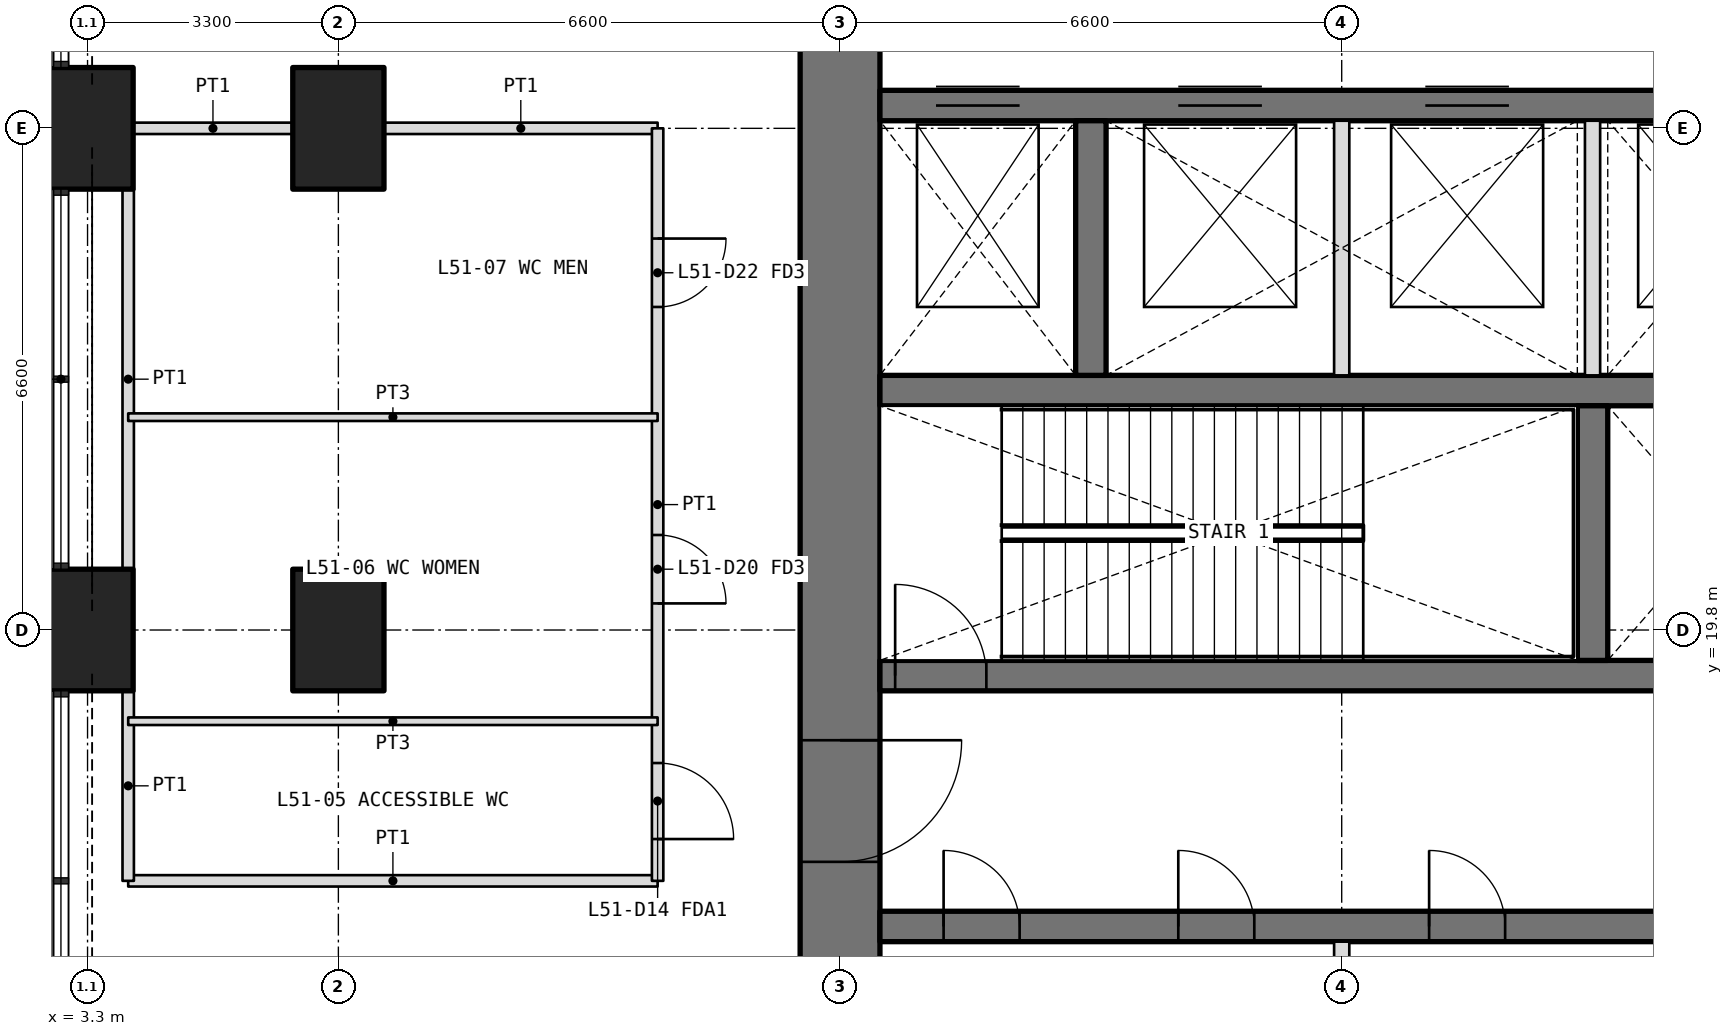
"""IFC4 building model, lengths in metres.
Left out: names, types, materials, properties, quantities, classifications, styles, units other than length and angle.
Written with IfcOpenShell. Run it as: python <this file> out.ifc"""

import sys

from ifc_helpers import new_model, si_unit, direction, frame, frame_2d, origin, origin_2d, place, context, subcontext, project, spatial, rectangle, extrude, element, fill, save


model = new_model("IFC4")
c1 = context("Model", 3, precision=1e-05, world=origin(), true_north=direction((0.0, 1.0)))
c2 = subcontext(c1, "Body", "Model", "MODEL_VIEW")
j1 = project(units=[si_unit("LENGTHUNIT", "METRE"), si_unit("PLANEANGLEUNIT", "RADIAN")], contexts=[c1])
p1 = place(None, origin())
s1 = spatial("IfcSite", under=j1, at=p1, CompositionType="ELEMENT")
p2 = place(p1, origin())
s2 = spatial("IfcBuilding", under=s1, at=p2, CompositionType="ELEMENT")
p3 = place(p2, frame((0.0, 0.0, 222.9)))
s3 = spatial("IfcBuildingStorey", under=s2, at=p3, CompositionType="ELEMENT", Elevation=222.9)
for number, where, z_axis, x_axis in (
    (1, (3.3, 19.8, 0.0), (0.0, 0.0, 1.0), (0.0, 1.0, 0.0)),
    (2, (3.3, 26.4, 0.0), (0.0, 0.0, 1.0), (0.0, 1.0, 0.0)),
    (3, (6.6, 19.8, 0.0), (0.0, 0.0, 1.0), (0.0, 1.0, 0.0)),
    (4, (6.6, 26.4, 0.0), (0.0, 0.0, 1.0), (0.0, 1.0, 0.0)),
):
    element("IfcColumn", number, at=place(p3, frame(where, z_axis=z_axis, x_axis=x_axis)), inside=s3, PredefinedType="COLUMN", context=c2, shape_type="SweptSolid", body=[
        extrude(rectangle(XDim=1.6, YDim=1.2, at=origin_2d()), origin(), (0.0, 0.0, 1.0), 6.3),
    ])
p4 = place(p3, frame((13.2, 32.475, 0.0), z_axis=(0.0, 0.0, 1.0), x_axis=(0.0, -1.0, 0.0)))
e5 = element("IfcWall", 5, at=p4, inside=s3, PredefinedType="SHEAR", context=c2, shape_type="SweptSolid", body=[
    extrude(rectangle(XDim=18.75, YDim=1.05, at=frame_2d((9.375, 0.0))), origin(), (0.0, 0.0, 1.0), 6.3),
])
p5 = place(p4, frame((14.125, 0.0, 0.0)))
e6 = element("IfcOpeningElement", 6, at=p5, cuts=e5, PredefinedType="OPENING", context=c2, shape_type="SweptSolid", body=[
    extrude(rectangle(XDim=1.6, YDim=2.1, at=frame_2d((0.8, 1.05))), frame((0.0, 0.535, 0.0), z_axis=(0.0, -1.0, 0.0), x_axis=(1.0, 0.0, 0.0)), (0.0, 0.0, 1.0), 1.07),
])
p6 = place(p4, frame((3.325, 0.0, 0.0)))
e7 = element("IfcOpeningElement", 7, at=p6, cuts=e5, PredefinedType="OPENING", context=c2, shape_type="SweptSolid", body=[
    extrude(rectangle(XDim=1.6, YDim=2.1, at=frame_2d((0.8, 1.05))), frame((0.0, 0.535, 0.0), z_axis=(0.0, -1.0, 0.0), x_axis=(1.0, 0.0, 0.0)), (0.0, 0.0, 1.0), 1.07),
])
p7 = place(p3, frame((13.725, 15.9, 0.0), z_axis=(0.0, 0.0, 1.0), x_axis=(1.0, 0.0, 0.0)))
e8 = element("IfcWall", 8, at=p7, inside=s3, PredefinedType="SHEAR", context=c2, shape_type="SweptSolid", body=[
    extrude(rectangle(XDim=25.35, YDim=0.4, at=frame_2d((12.675, 0.0))), origin(), (0.0, 0.0, 1.0), 6.3),
])
p8 = place(p7, frame((0.837, 0.0, 0.0)))
e9 = element("IfcOpeningElement", 9, at=p8, cuts=e8, PredefinedType="OPENING", context=c2, shape_type="SweptSolid", body=[
    extrude(rectangle(XDim=1.0, YDim=2.1, at=frame_2d((0.5, 1.05))), frame((0.0, 0.21, 0.0), z_axis=(0.0, -1.0, 0.0), x_axis=(1.0, 0.0, 0.0)), (0.0, 0.0, 1.0), 0.42),
])
p9 = place(p7, frame((3.925, 0.0, 0.0)))
e10 = element("IfcOpeningElement", 10, at=p9, cuts=e8, PredefinedType="OPENING", context=c2, shape_type="SweptSolid", body=[
    extrude(rectangle(XDim=1.0, YDim=2.1, at=frame_2d((0.5, 1.05))), frame((0.0, 0.21, 0.0), z_axis=(0.0, -1.0, 0.0), x_axis=(1.0, 0.0, 0.0)), (0.0, 0.0, 1.0), 0.42),
])
p10 = place(p7, frame((7.225, 0.0, 0.0)))
e11 = element("IfcOpeningElement", 11, at=p10, cuts=e8, PredefinedType="OPENING", context=c2, shape_type="SweptSolid", body=[
    extrude(rectangle(XDim=1.0, YDim=2.1, at=frame_2d((0.5, 1.05))), frame((0.0, 0.21, 0.0), z_axis=(0.0, -1.0, 0.0), x_axis=(1.0, 0.0, 0.0)), (0.0, 0.0, 1.0), 0.42),
])
p11 = place(p7, frame((10.525, 0.0, 0.0)))
e12 = element("IfcOpeningElement", 12, at=p11, cuts=e8, PredefinedType="OPENING", context=c2, shape_type="SweptSolid", body=[
    extrude(rectangle(XDim=1.0, YDim=2.1, at=frame_2d((0.5, 1.05))), frame((0.0, 0.21, 0.0), z_axis=(0.0, -1.0, 0.0), x_axis=(1.0, 0.0, 0.0)), (0.0, 0.0, 1.0), 0.42),
])
p12 = place(p7, frame((13.825, 0.0, 0.0)))
e13 = element("IfcOpeningElement", 13, at=p12, cuts=e8, PredefinedType="OPENING", context=c2, shape_type="SweptSolid", body=[
    extrude(rectangle(XDim=1.0, YDim=2.1, at=frame_2d((0.5, 1.05))), frame((0.0, 0.21, 0.0), z_axis=(0.0, -1.0, 0.0), x_axis=(1.0, 0.0, 0.0)), (0.0, 0.0, 1.0), 0.42),
])
p13 = place(p7, frame((17.125, 0.0, 0.0)))
e14 = element("IfcOpeningElement", 14, at=p13, cuts=e8, PredefinedType="OPENING", context=c2, shape_type="SweptSolid", body=[
    extrude(rectangle(XDim=1.0, YDim=2.1, at=frame_2d((0.5, 1.05))), frame((0.0, 0.21, 0.0), z_axis=(0.0, -1.0, 0.0), x_axis=(1.0, 0.0, 0.0)), (0.0, 0.0, 1.0), 0.42),
])
p14 = place(p7, frame((20.425, 0.0, 0.0)))
e15 = element("IfcOpeningElement", 15, at=p14, cuts=e8, PredefinedType="OPENING", context=c2, shape_type="SweptSolid", body=[
    extrude(rectangle(XDim=1.0, YDim=2.1, at=frame_2d((0.5, 1.05))), frame((0.0, 0.21, 0.0), z_axis=(0.0, -1.0, 0.0), x_axis=(1.0, 0.0, 0.0)), (0.0, 0.0, 1.0), 0.42),
])
p15 = place(p7, frame((23.512, 0.0, 0.0)))
e16 = element("IfcOpeningElement", 16, at=p15, cuts=e8, PredefinedType="OPENING", context=c2, shape_type="SweptSolid", body=[
    extrude(rectangle(XDim=1.0, YDim=2.1, at=frame_2d((0.5, 1.05))), frame((0.0, 0.21, 0.0), z_axis=(0.0, -1.0, 0.0), x_axis=(1.0, 0.0, 0.0)), (0.0, 0.0, 1.0), 0.42),
])
p16 = place(p3, frame((13.725, 19.2, 0.0), z_axis=(0.0, 0.0, 1.0), x_axis=(1.0, 0.0, 0.0)))
e17 = element("IfcWall", 17, at=p16, inside=s3, PredefinedType="SHEAR", context=c2, shape_type="SweptSolid", body=[
    extrude(rectangle(XDim=25.35, YDim=0.4, at=frame_2d((12.675, 0.0))), origin(), (0.0, 0.0, 1.0), 6.3),
])
p17 = place(p16, frame((10.575, 0.0, 0.0)))
e18 = element("IfcOpeningElement", 18, at=p17, cuts=e17, PredefinedType="OPENING", context=c2, shape_type="SweptSolid", body=[
    extrude(rectangle(XDim=0.9, YDim=2.1, at=frame_2d((0.45, 1.05))), frame((0.0, 0.21, 0.0), z_axis=(0.0, -1.0, 0.0), x_axis=(1.0, 0.0, 0.0)), (0.0, 0.0, 1.0), 0.42),
])
p18 = place(p16, frame((13.875, 0.0, 0.0)))
e19 = element("IfcOpeningElement", 19, at=p18, cuts=e17, PredefinedType="OPENING", context=c2, shape_type="SweptSolid", body=[
    extrude(rectangle(XDim=0.9, YDim=2.1, at=frame_2d((0.45, 1.05))), frame((0.0, 0.21, 0.0), z_axis=(0.0, -1.0, 0.0), x_axis=(1.0, 0.0, 0.0)), (0.0, 0.0, 1.0), 0.42),
])
p19 = place(p16, frame((0.2, 0.0, 0.0)))
e20 = element("IfcOpeningElement", 20, at=p19, cuts=e17, PredefinedType="OPENING", context=c2, shape_type="SweptSolid", body=[
    extrude(rectangle(XDim=1.2, YDim=2.1, at=frame_2d((0.6, 1.05))), frame((0.0, 0.21, 0.0), z_axis=(0.0, -1.0, 0.0), x_axis=(1.0, 0.0, 0.0)), (0.0, 0.0, 1.0), 0.42),
])
p20 = place(p16, frame((23.512, 0.0, 0.0)))
e21 = element("IfcOpeningElement", 21, at=p20, cuts=e17, PredefinedType="OPENING", context=c2, shape_type="SweptSolid", body=[
    extrude(rectangle(XDim=1.1, YDim=2.1, at=frame_2d((0.55, 1.05))), frame((0.0, 0.21, 0.0), z_axis=(0.0, -1.0, 0.0), x_axis=(1.0, 0.0, 0.0)), (0.0, 0.0, 1.0), 0.42),
])
p21 = place(p16, frame((17.125, 0.0, 0.0)))
e22 = element("IfcOpeningElement", 22, at=p21, cuts=e17, PredefinedType="OPENING", context=c2, shape_type="SweptSolid", body=[
    extrude(rectangle(XDim=1.1, YDim=2.1, at=frame_2d((0.55, 1.05))), frame((0.0, 0.21, 0.0), z_axis=(0.0, -1.0, 0.0), x_axis=(1.0, 0.0, 0.0)), (0.0, 0.0, 1.0), 0.42),
])
p22 = place(p16, frame((20.325, 0.0, 0.0)))
e23 = element("IfcOpeningElement", 23, at=p22, cuts=e17, PredefinedType="OPENING", context=c2, shape_type="SweptSolid", body=[
    extrude(rectangle(XDim=1.1, YDim=2.1, at=frame_2d((0.55, 1.05))), frame((0.0, 0.21, 0.0), z_axis=(0.0, -1.0, 0.0), x_axis=(1.0, 0.0, 0.0)), (0.0, 0.0, 1.0), 0.42),
])
p23 = place(p3, frame((13.725, 22.95, 0.0), z_axis=(0.0, 0.0, 1.0), x_axis=(1.0, 0.0, 0.0)))
e24 = element("IfcWall", 24, at=p23, inside=s3, PredefinedType="SHEAR", context=c2, shape_type="SweptSolid", body=[
    extrude(rectangle(XDim=25.35, YDim=0.4, at=frame_2d((12.675, 0.0))), origin(), (0.0, 0.0, 1.0), 6.3),
])
p24 = place(p3, frame((13.725, 26.7, 0.0), z_axis=(0.0, 0.0, 1.0), x_axis=(1.0, 0.0, 0.0)))
e25 = element("IfcWall", 25, at=p24, inside=s3, PredefinedType="SHEAR", context=c2, shape_type="SweptSolid", body=[
    extrude(rectangle(XDim=25.35, YDim=0.4, at=frame_2d((12.675, 0.0))), origin(), (0.0, 0.0, 1.0), 6.3),
])
p25 = place(p24, frame((23.95, 0.0, 0.0)))
e26 = element("IfcOpeningElement", 26, at=p25, cuts=e25, PredefinedType="OPENING", context=c2, shape_type="SweptSolid", body=[
    extrude(rectangle(XDim=1.2, YDim=2.1, at=frame_2d((0.6, 1.05))), frame((0.0, 0.21, 0.0), z_axis=(0.0, -1.0, 0.0), x_axis=(1.0, 0.0, 0.0)), (0.0, 0.0, 1.0), 0.42),
])
p26 = place(p24, frame((0.738, 0.0, 0.0)))
e27 = element("IfcOpeningElement", 27, at=p26, cuts=e25, PredefinedType="OPENING", context=c2, shape_type="SweptSolid", body=[
    extrude(rectangle(XDim=1.1, YDim=2.1, at=frame_2d((0.55, 1.05))), frame((0.0, 0.21, 0.0), z_axis=(0.0, -1.0, 0.0), x_axis=(1.0, 0.0, 0.0)), (0.0, 0.0, 1.0), 0.42),
])
p27 = place(p24, frame((3.925, 0.0, 0.0)))
e28 = element("IfcOpeningElement", 28, at=p27, cuts=e25, PredefinedType="OPENING", context=c2, shape_type="SweptSolid", body=[
    extrude(rectangle(XDim=1.1, YDim=2.1, at=frame_2d((0.55, 1.05))), frame((0.0, 0.21, 0.0), z_axis=(0.0, -1.0, 0.0), x_axis=(1.0, 0.0, 0.0)), (0.0, 0.0, 1.0), 0.42),
])
p28 = place(p24, frame((7.175, 0.0, 0.0)))
e29 = element("IfcOpeningElement", 29, at=p28, cuts=e25, PredefinedType="OPENING", context=c2, shape_type="SweptSolid", body=[
    extrude(rectangle(XDim=1.1, YDim=2.1, at=frame_2d((0.55, 1.05))), frame((0.0, 0.21, 0.0), z_axis=(0.0, -1.0, 0.0), x_axis=(1.0, 0.0, 0.0)), (0.0, 0.0, 1.0), 0.42),
])
p29 = place(p24, frame((10.425, 0.0, 0.0)))
e30 = element("IfcOpeningElement", 30, at=p29, cuts=e25, PredefinedType="OPENING", context=c2, shape_type="SweptSolid", body=[
    extrude(rectangle(XDim=1.1, YDim=2.1, at=frame_2d((0.55, 1.05))), frame((0.0, 0.21, 0.0), z_axis=(0.0, -1.0, 0.0), x_axis=(1.0, 0.0, 0.0)), (0.0, 0.0, 1.0), 0.42),
])
p30 = place(p24, frame((13.775, 0.0, 0.0)))
e31 = element("IfcOpeningElement", 31, at=p30, cuts=e25, PredefinedType="OPENING", context=c2, shape_type="SweptSolid", body=[
    extrude(rectangle(XDim=1.1, YDim=2.1, at=frame_2d((0.55, 1.05))), frame((0.0, 0.21, 0.0), z_axis=(0.0, -1.0, 0.0), x_axis=(1.0, 0.0, 0.0)), (0.0, 0.0, 1.0), 0.42),
])
for number, where, z_axis, x_axis in (
    (32, (23.1, 19.4, 0.0), (0.0, 0.0, 1.0), (0.0, 1.0, 0.0)),
    (33, (16.5, 23.15, 0.0), (0.0, 0.0, 1.0), (0.0, 1.0, 0.0)),
):
    element("IfcWall", number, at=place(p3, frame(where, z_axis=z_axis, x_axis=x_axis)), inside=s3, PredefinedType="SHEAR", context=c2, shape_type="SweptSolid", body=[
        extrude(rectangle(XDim=3.35, YDim=0.4, at=frame_2d((1.675, 0.0))), origin(), (0.0, 0.0, 1.0), 6.3),
    ])
p31 = place(p3, frame((19.8, 13.725, 0.0), z_axis=(0.0, 0.0, 1.0), x_axis=(0.0, 1.0, 0.0)))
e34 = element("IfcWall", 34, at=p31, inside=s3, PredefinedType="PARTITIONING", context=c2, shape_type="SweptSolid", body=[
    extrude(rectangle(XDim=1.975, YDim=0.2, at=frame_2d((0.987, 0.0))), origin(), (0.0, 0.0, 1.0), 6.3),
])
for number, where, z_axis, x_axis in (
    (35, (19.8, 23.15, 0.0), (0.0, 0.0, 1.0), (0.0, 1.0, 0.0)),
    (36, (23.1, 23.15, 0.0), (0.0, 0.0, 1.0), (0.0, 1.0, 0.0)),
):
    element("IfcWall", number, at=place(p3, frame(where, z_axis=z_axis, x_axis=x_axis)), inside=s3, PredefinedType="PARTITIONING", context=c2, shape_type="SweptSolid", body=[
        extrude(rectangle(XDim=3.35, YDim=0.2, at=frame_2d((1.675, 0.0))), origin(), (0.0, 0.0, 1.0), 6.3),
    ])
p32 = place(p3, frame((10.8, 16.5, 0.0), z_axis=(0.0, 0.0, 1.0), x_axis=(-1.0, 0.0, 0.0)))
e37 = element("IfcWall", 37, at=p32, inside=s3, PredefinedType="PARTITIONING", context=c2, shape_type="SweptSolid", body=[
    extrude(rectangle(XDim=6.965, YDim=0.15, at=frame_2d((3.482, 0.0))), origin(), (0.0, 0.0, 1.0), 4.0),
])
p33 = place(p3, frame((3.9, 26.4, 0.0), z_axis=(0.0, 0.0, 1.0), x_axis=(1.0, 0.0, 0.0)))
e38 = element("IfcWall", 38, at=p33, inside=s3, PredefinedType="PARTITIONING", context=c2, shape_type="SweptSolid", body=[
    extrude(rectangle(XDim=2.1, YDim=0.15, at=frame_2d((1.05, 0.0))), origin(), (0.0, 0.0, 1.0), 4.0),
])
p34 = place(p3, frame((7.2, 26.4, 0.0), z_axis=(0.0, 0.0, 1.0), x_axis=(1.0, 0.0, 0.0)))
e39 = element("IfcWall", 39, at=p34, inside=s3, PredefinedType="PARTITIONING", context=c2, shape_type="SweptSolid", body=[
    extrude(rectangle(XDim=3.6, YDim=0.15, at=frame_2d((1.8, 0.0))), origin(), (0.0, 0.0, 1.0), 4.0),
])
p35 = place(p3, frame((3.835, 16.5, 0.0), z_axis=(0.0, 0.0, 1.0), x_axis=(0.0, 1.0, 0.0)))
e40 = element("IfcWall", 40, at=p35, inside=s3, PredefinedType="PARTITIONING", context=c2, shape_type="SweptSolid", body=[
    extrude(rectangle(XDim=2.5, YDim=0.15, at=frame_2d((1.25, 0.0))), origin(), (0.0, 0.0, 1.0), 4.0),
])
p36 = place(p3, frame((3.835, 20.6, 0.0), z_axis=(0.0, 0.0, 1.0), x_axis=(0.0, 1.0, 0.0)))
e41 = element("IfcWall", 41, at=p36, inside=s3, PredefinedType="PARTITIONING", context=c2, shape_type="SweptSolid", body=[
    extrude(rectangle(XDim=5.0, YDim=0.15, at=frame_2d((2.5, 0.0))), origin(), (0.0, 0.0, 1.0), 4.0),
])
p37 = place(p3, frame((10.8, 26.4, 0.0), z_axis=(0.0, 0.0, 1.0), x_axis=(0.0, -1.0, 0.0)))
e42 = element("IfcWall", 42, at=p37, inside=s3, PredefinedType="PARTITIONING", context=c2, shape_type="SweptSolid", body=[
    extrude(rectangle(XDim=9.9, YDim=0.15, at=frame_2d((4.95, 0.0))), origin(), (0.0, 0.0, 1.0), 4.0),
])
p38 = place(p37, frame((8.35, 0.0, 0.0)))
e43 = element("IfcOpeningElement", 43, at=p38, cuts=e42, PredefinedType="OPENING", context=c2, shape_type="SweptSolid", body=[
    extrude(rectangle(XDim=1.0, YDim=2.1, at=frame_2d((0.5, 1.05))), frame((0.0, 0.085, 0.0), z_axis=(0.0, -1.0, 0.0), x_axis=(1.0, 0.0, 0.0)), (0.0, 0.0, 1.0), 0.17),
])
p39 = place(p37, frame((5.35, 0.0, 0.0)))
e44 = element("IfcOpeningElement", 44, at=p39, cuts=e42, PredefinedType="OPENING", context=c2, shape_type="SweptSolid", body=[
    extrude(rectangle(XDim=0.9, YDim=2.1, at=frame_2d((0.45, 1.05))), frame((0.0, 0.085, 0.0), z_axis=(0.0, -1.0, 0.0), x_axis=(1.0, 0.0, 0.0)), (0.0, 0.0, 1.0), 0.17),
])
p40 = place(p37, frame((1.45, 0.0, 0.0)))
e45 = element("IfcOpeningElement", 45, at=p40, cuts=e42, PredefinedType="OPENING", context=c2, shape_type="SweptSolid", body=[
    extrude(rectangle(XDim=0.9, YDim=2.1, at=frame_2d((0.45, 1.05))), frame((0.0, 0.085, 0.0), z_axis=(0.0, -1.0, 0.0), x_axis=(1.0, 0.0, 0.0)), (0.0, 0.0, 1.0), 0.17),
])
for number, where, z_axis, x_axis in (
    (46, (3.835, 18.6, 0.0), (0.0, 0.0, 1.0), (1.0, 0.0, 0.0)),
    (47, (3.835, 22.6, 0.0), (0.0, 0.0, 1.0), (1.0, 0.0, 0.0)),
):
    element("IfcWall", number, at=place(p3, frame(where, z_axis=z_axis, x_axis=x_axis)), inside=s3, PredefinedType="PARTITIONING", context=c2, shape_type="SweptSolid", body=[
        extrude(rectangle(XDim=6.965, YDim=0.1, at=frame_2d((3.482, 0.0))), origin(), (0.0, 0.0, 1.0), 4.0),
    ])
p41 = place(p38, origin())
e48 = element("IfcDoor", 48, at=p41, inside=s3, OperationType="SINGLE_SWING_RIGHT", PredefinedType="DOOR", context=c2, shape_type="SweptSolid", body=[
    extrude(rectangle(XDim=1.0, YDim=2.1, at=frame_2d((0.5, 1.05))), frame((0.0, 0.025, 0.0), z_axis=(0.0, -1.0, 0.0), x_axis=(1.0, 0.0, 0.0)), (0.0, 0.0, 1.0), 0.05),
])
fill(e43, e48)
p42 = place(p39, origin())
e49 = element("IfcDoor", 49, at=p42, inside=s3, OperationType="SINGLE_SWING_RIGHT", PredefinedType="DOOR", context=c2, shape_type="SweptSolid", body=[
    extrude(rectangle(XDim=0.9, YDim=2.1, at=frame_2d((0.45, 1.05))), frame((0.0, 0.025, 0.0), z_axis=(0.0, -1.0, 0.0), x_axis=(1.0, 0.0, 0.0)), (0.0, 0.0, 1.0), 0.05),
])
fill(e44, e49)
p43 = place(p40, origin())
e50 = element("IfcDoor", 50, at=p43, inside=s3, OperationType="SINGLE_SWING_LEFT", PredefinedType="DOOR", context=c2, shape_type="SweptSolid", body=[
    extrude(rectangle(XDim=0.9, YDim=2.1, at=frame_2d((0.45, 1.05))), frame((0.0, 0.025, 0.0), z_axis=(0.0, -1.0, 0.0), x_axis=(1.0, 0.0, 0.0)), (0.0, 0.0, 1.0), 0.05),
])
fill(e45, e50)
p44 = place(p8, origin())
e51 = element("IfcDoor", 51, at=p44, inside=s3, OperationType="SINGLE_SWING_LEFT", PredefinedType="DOOR", context=c2, shape_type="SweptSolid", body=[
    extrude(rectangle(XDim=1.0, YDim=2.1, at=frame_2d((0.5, 1.05))), frame((0.0, 0.025, 0.0), z_axis=(0.0, -1.0, 0.0), x_axis=(1.0, 0.0, 0.0)), (0.0, 0.0, 1.0), 0.05),
])
fill(e9, e51)
p45 = place(p9, origin())
e52 = element("IfcDoor", 52, at=p45, inside=s3, OperationType="SINGLE_SWING_LEFT", PredefinedType="DOOR", context=c2, shape_type="SweptSolid", body=[
    extrude(rectangle(XDim=1.0, YDim=2.1, at=frame_2d((0.5, 1.05))), frame((0.0, 0.025, 0.0), z_axis=(0.0, -1.0, 0.0), x_axis=(1.0, 0.0, 0.0)), (0.0, 0.0, 1.0), 0.05),
])
fill(e10, e52)
p46 = place(p10, origin())
e53 = element("IfcDoor", 53, at=p46, inside=s3, OperationType="SINGLE_SWING_LEFT", PredefinedType="DOOR", context=c2, shape_type="SweptSolid", body=[
    extrude(rectangle(XDim=1.0, YDim=2.1, at=frame_2d((0.5, 1.05))), frame((0.0, 0.025, 0.0), z_axis=(0.0, -1.0, 0.0), x_axis=(1.0, 0.0, 0.0)), (0.0, 0.0, 1.0), 0.05),
])
fill(e11, e53)
p47 = place(p19, origin())
e54 = element("IfcDoor", 54, at=p47, inside=s3, OperationType="SINGLE_SWING_LEFT", PredefinedType="DOOR", context=c2, shape_type="SweptSolid", body=[
    extrude(rectangle(XDim=1.2, YDim=2.1, at=frame_2d((0.6, 1.05))), frame((0.0, 0.025, 0.0), z_axis=(0.0, -1.0, 0.0), x_axis=(1.0, 0.0, 0.0)), (0.0, 0.0, 1.0), 0.05),
])
fill(e20, e54)
p48 = place(p5, origin())
e55 = element("IfcDoor", 55, at=p48, inside=s3, OperationType="DOUBLE_DOOR_DOUBLE_SWING", PredefinedType="DOOR", context=c2, shape_type="SweptSolid", body=[
    extrude(rectangle(XDim=1.6, YDim=2.1, at=frame_2d((0.8, 1.05))), frame((0.0, 0.025, 0.0), z_axis=(0.0, -1.0, 0.0), x_axis=(1.0, 0.0, 0.0)), (0.0, 0.0, 1.0), 0.05),
])
fill(e6, e55)
p49 = place(p26, origin())
e56 = element("IfcDoor", 56, at=p49, inside=s3, OperationType="DOUBLE_DOOR_SLIDING", PredefinedType="DOOR", context=c2, shape_type="SweptSolid", body=[
    extrude(rectangle(XDim=1.1, YDim=2.1, at=frame_2d((0.55, 1.05))), frame((0.0, 0.025, 0.0), z_axis=(0.0, -1.0, 0.0), x_axis=(1.0, 0.0, 0.0)), (0.0, 0.0, 1.0), 0.05),
])
fill(e27, e56)
p50 = place(p27, origin())
e57 = element("IfcDoor", 57, at=p50, inside=s3, OperationType="DOUBLE_DOOR_SLIDING", PredefinedType="DOOR", context=c2, shape_type="SweptSolid", body=[
    extrude(rectangle(XDim=1.1, YDim=2.1, at=frame_2d((0.55, 1.05))), frame((0.0, 0.025, 0.0), z_axis=(0.0, -1.0, 0.0), x_axis=(1.0, 0.0, 0.0)), (0.0, 0.0, 1.0), 0.05),
])
fill(e28, e57)
p51 = place(p28, origin())
e58 = element("IfcDoor", 58, at=p51, inside=s3, OperationType="DOUBLE_DOOR_SLIDING", PredefinedType="DOOR", context=c2, shape_type="SweptSolid", body=[
    extrude(rectangle(XDim=1.1, YDim=2.1, at=frame_2d((0.55, 1.05))), frame((0.0, 0.025, 0.0), z_axis=(0.0, -1.0, 0.0), x_axis=(1.0, 0.0, 0.0)), (0.0, 0.0, 1.0), 0.05),
])
fill(e29, e58)
save(model, sys.argv[1])
